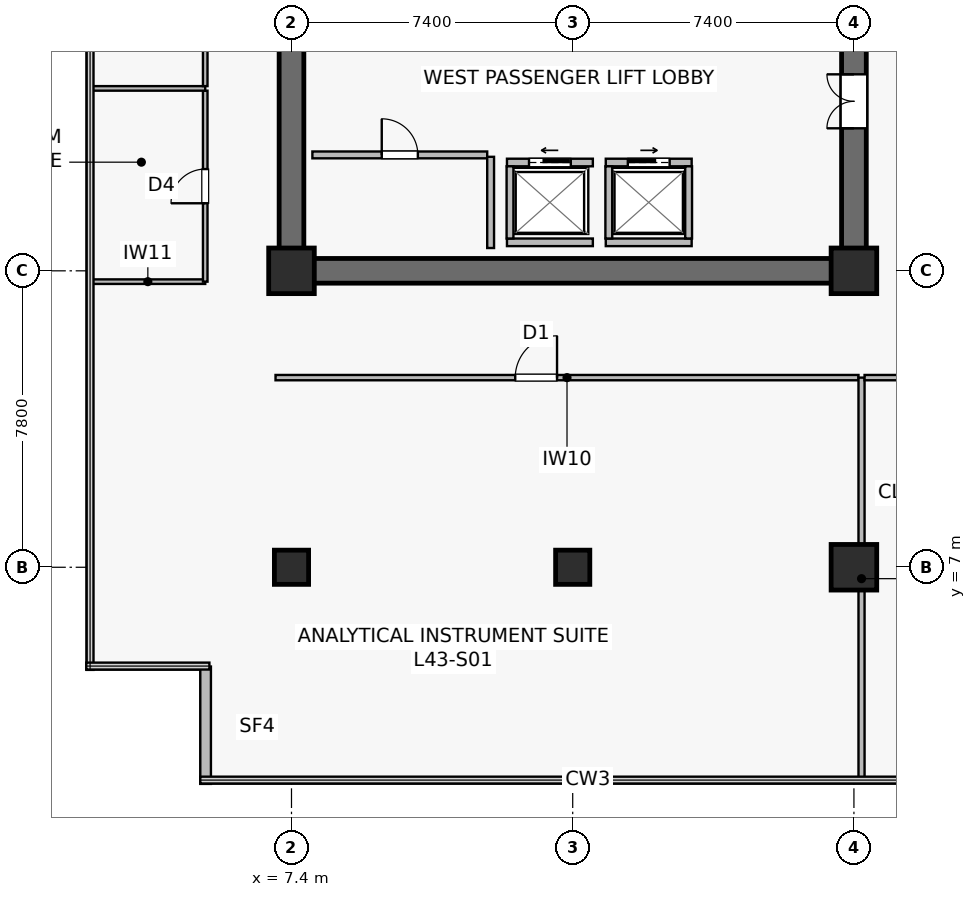
"""IFC4 building model, lengths in metres.
Left out: names, types, materials, properties, quantities, classifications, styles, units other than length and angle.
Written with IfcOpenShell. Run it as: python <this file> out.ifc"""

import sys

from ifc_helpers import new_model, si_unit, direction, frame, frame_2d, origin, origin_2d, place, context, subcontext, project, spatial, rectangle, extrude, source, transform, mapped, element, fill, save


model = new_model("IFC4")
c1 = context("Model", 3, precision=1e-05, world=origin(), true_north=direction((0.0, 1.0)))
c2 = subcontext(c1, "Body", "Model", "MODEL_VIEW")
j1 = project(units=[si_unit("LENGTHUNIT", "METRE"), si_unit("PLANEANGLEUNIT", "RADIAN")], contexts=[c1])
p1 = place(None, origin())
s1 = spatial("IfcSite", under=j1, at=p1, CompositionType="ELEMENT")
p2 = place(p1, origin())
s2 = spatial("IfcBuilding", under=s1, at=p2, CompositionType="ELEMENT")
p3 = place(p2, frame((0.0, 0.0, 178.9)))
s3 = spatial("IfcBuildingStorey", under=s2, at=p3, CompositionType="ELEMENT", Elevation=178.9)
p4 = place(p3, frame((7.075, 14.8, 0.0), z_axis=(0.0, 0.0, 1.0), x_axis=(1.0, 0.0, 0.0)))
e1 = element("IfcWall", 1, at=p4, inside=s3, PredefinedType="SHEAR", context=c2, shape_type="SweptSolid", body=[
    extrude(rectangle(XDim=15.45, YDim=0.65, at=frame_2d((7.725, 0.0))), origin(), (0.0, 0.0, 1.0), 3.79),
])
p5 = place(p3, frame((7.4, 15.125, 0.0), z_axis=(0.0, 0.0, 1.0), x_axis=(0.0, 1.0, 0.0)))
e2 = element("IfcWall", 2, at=p5, inside=s3, PredefinedType="SHEAR", context=c2, shape_type="SweptSolid", body=[
    extrude(rectangle(XDim=18.35, YDim=0.65, at=frame_2d((9.175, 0.0))), origin(), (0.0, 0.0, 1.0), 3.79),
])
p6 = place(p3, frame((22.2, 15.125, 0.0), z_axis=(0.0, 0.0, 1.0), x_axis=(0.0, 1.0, 0.0)))
e3 = element("IfcWall", 3, at=p6, inside=s3, PredefinedType="SHEAR", context=c2, shape_type="SweptSolid", body=[
    extrude(rectangle(XDim=18.35, YDim=0.65, at=frame_2d((9.175, 0.0))), origin(), (0.0, 0.0, 1.0), 3.79),
])
p7 = place(p6, frame((3.425, 0.0, 0.0)))
e4 = element("IfcOpeningElement", 4, at=p7, cuts=e3, PredefinedType="OPENING", context=c2, shape_type="SweptSolid", body=[
    extrude(rectangle(XDim=1.42, YDim=2.2, at=frame_2d((0.71, 1.1))), frame((0.0, 0.335, 0.0), z_axis=(0.0, -1.0, 0.0), x_axis=(1.0, 0.0, 0.0)), (0.0, 0.0, 1.0), 0.67),
])
m1 = source(origin(), c2, "Body", "SweptSolid", [
    extrude(rectangle(XDim=0.9, YDim=0.9, at=origin_2d()), origin(), (0.0, 0.0, 1.0), 4.1),
])
p8 = place(p3, frame((14.8, 7.0, 0.0), z_axis=(0.0, 0.0, 1.0), x_axis=(1.0, 0.0, 0.0)))
e5 = element("IfcColumn", 5, at=p8, inside=s3, PredefinedType="COLUMN", context=c2, shape_type="MappedRepresentation", body=[
    mapped(m1, transform((0.0, 0.0, 0.0), scale=1.0)),
])
m2 = source(origin(), c2, "Body", "SweptSolid", [
    extrude(rectangle(XDim=1.2, YDim=1.2, at=origin_2d()), origin(), (0.0, 0.0, 1.0), 4.1),
])
for number, where, z_axis, x_axis in (
    (6, (22.2, 7.0, 0.0), (0.0, 0.0, 1.0), (1.0, 0.0, 0.0)),
    (7, (7.4, 14.8, 0.0), (0.0, 0.0, 1.0), (1.0, 0.0, 0.0)),
    (8, (22.2, 14.8, 0.0), (0.0, 0.0, 1.0), (1.0, 0.0, 0.0)),
):
    element("IfcColumn", number, at=place(p3, frame(where, z_axis=z_axis, x_axis=x_axis)), inside=s3, PredefinedType="COLUMN", context=c2, shape_type="MappedRepresentation", body=[
        mapped(m2, transform((0.0, 0.0, 0.0), scale=1.0)),
    ])
p9 = place(p3, frame((7.4, 7.0, 0.0), z_axis=(0.0, 0.0, 1.0), x_axis=(1.0, 0.0, 0.0)))
e9 = element("IfcColumn", 9, at=p9, inside=s3, PredefinedType="COLUMN", context=c2, shape_type="MappedRepresentation", body=[
    mapped(m1, transform((0.0, 0.0, 0.0), scale=1.0)),
])
p10 = place(p3, frame((5.14, 4.388, 0.0), z_axis=(0.0, 0.0, 1.0), x_axis=(0.0, -1.0, 0.0)))
e10 = element("IfcWall", 10, at=p10, inside=s3, PredefinedType="STANDARD", context=c2, shape_type="SweptSolid", body=[
    extrude(rectangle(XDim=3.088, YDim=0.28, at=frame_2d((1.544, 0.0))), origin(), (0.0, 0.0, 1.0), 3.79),
])
p11 = place(p3, frame((13.07, 17.65, 0.0), z_axis=(0.0, 0.0, 1.0), x_axis=(1.0, 0.0, 0.0)))
e11 = element("IfcWall", 11, at=p11, inside=s3, PredefinedType="SOLIDWALL", context=c2, shape_type="SweptSolid", body=[
    extrude(rectangle(XDim=2.26, YDim=0.2, at=frame_2d((1.13, 0.0))), origin(), (0.0, 0.0, 1.0), 3.187),
])
p12 = place(p11, frame((0.58, 0.0, 0.0)))
e12 = element("IfcOpeningElement", 12, at=p12, cuts=e11, PredefinedType="OPENING", context=c2, shape_type="SweptSolid", body=[
    extrude(rectangle(XDim=1.1, YDim=2.22, at=frame_2d((0.55, 1.11))), frame((0.0, 0.11, 0.0), z_axis=(0.0, -1.0, 0.0), x_axis=(1.0, 0.0, 0.0)), (0.0, 0.0, 1.0), 0.22),
])
p13 = place(p3, frame((13.07, 15.55, 0.0), z_axis=(0.0, 0.0, 1.0), x_axis=(1.0, 0.0, 0.0)))
e13 = element("IfcWall", 13, at=p13, inside=s3, PredefinedType="SOLIDWALL", context=c2, shape_type="SweptSolid", body=[
    extrude(rectangle(XDim=2.26, YDim=0.2, at=frame_2d((1.13, 0.0))), origin(), (0.0, 0.0, 1.0), 3.187),
])
p14 = place(p3, frame((13.15, 15.65, 0.0), z_axis=(0.0, 0.0, 1.0), x_axis=(0.0, 1.0, 0.0)))
e14 = element("IfcWall", 14, at=p14, inside=s3, PredefinedType="SOLIDWALL", context=c2, shape_type="SweptSolid", body=[
    extrude(rectangle(XDim=1.9, YDim=0.18, at=frame_2d((0.95, 0.0))), origin(), (0.0, 0.0, 1.0), 3.79),
])
p15 = place(p3, frame((15.67, 17.65, 0.0), z_axis=(0.0, 0.0, 1.0), x_axis=(1.0, 0.0, 0.0)))
e15 = element("IfcWall", 15, at=p15, inside=s3, PredefinedType="SOLIDWALL", context=c2, shape_type="SweptSolid", body=[
    extrude(rectangle(XDim=2.26, YDim=0.2, at=frame_2d((1.13, 0.0))), origin(), (0.0, 0.0, 1.0), 3.79),
])
p16 = place(p15, frame((0.58, 0.0, 0.0)))
e16 = element("IfcOpeningElement", 16, at=p16, cuts=e15, PredefinedType="OPENING", context=c2, shape_type="SweptSolid", body=[
    extrude(rectangle(XDim=1.1, YDim=2.22, at=frame_2d((0.55, 1.11))), frame((0.0, 0.11, 0.0), z_axis=(0.0, -1.0, 0.0), x_axis=(1.0, 0.0, 0.0)), (0.0, 0.0, 1.0), 0.22),
])
p17 = place(p3, frame((15.67, 15.55, 0.0), z_axis=(0.0, 0.0, 1.0), x_axis=(1.0, 0.0, 0.0)))
e17 = element("IfcWall", 17, at=p17, inside=s3, PredefinedType="SOLIDWALL", context=c2, shape_type="SweptSolid", body=[
    extrude(rectangle(XDim=2.26, YDim=0.2, at=frame_2d((1.13, 0.0))), origin(), (0.0, 0.0, 1.0), 3.79),
])
for number, where, z_axis, x_axis in (
    (18, (15.75, 15.65, 0.0), (0.0, 0.0, 1.0), (0.0, 1.0, 0.0)),
    (19, (17.85, 15.65, 0.0), (0.0, 0.0, 1.0), (0.0, 1.0, 0.0)),
):
    element("IfcWall", number, at=place(p3, frame(where, z_axis=z_axis, x_axis=x_axis)), inside=s3, PredefinedType="SOLIDWALL", context=c2, shape_type="SweptSolid", body=[
        extrude(rectangle(XDim=1.9, YDim=0.18, at=frame_2d((0.95, 0.0))), origin(), (0.0, 0.0, 1.0), 3.79),
    ])
p18 = place(p3, frame((7.95, 17.85, 0.0), z_axis=(0.0, 0.0, 1.0), x_axis=(1.0, 0.0, 0.0)))
e20 = element("IfcWall", 20, at=p18, inside=s3, PredefinedType="SOLIDWALL", context=c2, shape_type="SweptSolid", body=[
    extrude(rectangle(XDim=4.6, YDim=0.18, at=frame_2d((2.3, 0.0))), origin(), (0.0, 0.0, 1.0), 3.79),
])
p19 = place(p18, frame((1.825, 0.0, 0.0)))
e21 = element("IfcOpeningElement", 21, at=p19, cuts=e20, PredefinedType="OPENING", context=c2, shape_type="SweptSolid", body=[
    extrude(rectangle(XDim=0.95, YDim=2.15, at=frame_2d((0.475, 1.075))), frame((0.0, 0.1, 0.0), z_axis=(0.0, -1.0, 0.0), x_axis=(1.0, 0.0, 0.0)), (0.0, 0.0, 1.0), 0.2),
])
p20 = place(p3, frame((12.64, 15.4, 0.0), z_axis=(0.0, 0.0, 1.0), x_axis=(0.0, 1.0, 0.0)))
e22 = element("IfcWall", 22, at=p20, inside=s3, PredefinedType="SOLIDWALL", context=c2, shape_type="SweptSolid", body=[
    extrude(rectangle(XDim=2.4, YDim=0.18, at=frame_2d((1.2, 0.0))), origin(), (0.0, 0.0, 1.0), 3.79),
])
p21 = place(p3, frame((6.98, 11.99, 0.0), z_axis=(0.0, 0.0, 1.0), x_axis=(1.0, 0.0, 0.0)))
e23 = element("IfcWall", 23, at=p21, inside=s3, PredefinedType="PARTITIONING", context=c2, shape_type="SweptSolid", body=[
    extrude(rectangle(XDim=15.34, YDim=0.14, at=frame_2d((7.67, 0.0))), origin(), (0.0, 0.0, 1.0), 3.187),
])
p22 = place(p21, frame((6.308, 0.0, 0.0)))
e24 = element("IfcOpeningElement", 24, at=p22, cuts=e23, PredefinedType="OPENING", context=c2, shape_type="SweptSolid", body=[
    extrude(rectangle(XDim=1.1, YDim=2.18, at=frame_2d((0.55, 1.09))), frame((0.0, 0.08, 0.0), z_axis=(0.0, -1.0, 0.0), x_axis=(1.0, 0.0, 0.0)), (0.0, 0.0, 1.0), 0.16),
])
p23 = place(p3, frame((22.4, 1.41, 0.0), z_axis=(0.0, 0.0, 1.0), x_axis=(0.0, 1.0, 0.0)))
e25 = element("IfcWall", 25, at=p23, inside=s3, PredefinedType="PARTITIONING", context=c2, shape_type="SweptSolid", body=[
    extrude(rectangle(XDim=10.58, YDim=0.16, at=frame_2d((5.29, 0.0))), origin(), (0.0, 0.0, 1.0), 3.075),
])
p24 = place(p3, frame((22.48, 11.99, 0.0), z_axis=(0.0, 0.0, 1.0), x_axis=(1.0, 0.0, 0.0)))
e26 = element("IfcWall", 26, at=p24, inside=s3, PredefinedType="PARTITIONING", context=c2, shape_type="SweptSolid", body=[
    extrude(rectangle(XDim=13.44, YDim=0.14, at=frame_2d((6.72, 0.0))), origin(), (0.0, 0.0, 1.0), 3.187),
])
p25 = place(p24, frame((6.868, 0.0, 0.0)))
e27 = element("IfcOpeningElement", 27, at=p25, cuts=e26, PredefinedType="OPENING", context=c2, shape_type="SweptSolid", body=[
    extrude(rectangle(XDim=1.1, YDim=2.18, at=frame_2d((0.55, 1.09))), frame((0.0, 0.08, 0.0), z_axis=(0.0, -1.0, 0.0), x_axis=(1.0, 0.0, 0.0)), (0.0, 0.0, 1.0), 0.16),
])
p26 = place(p3, frame((2.11, 14.515, 0.0), z_axis=(0.0, 0.0, 1.0), x_axis=(1.0, 0.0, 0.0)))
e28 = element("IfcWall", 28, at=p26, inside=s3, PredefinedType="PARTITIONING", context=c2, shape_type="SweptSolid", body=[
    extrude(rectangle(XDim=3.02, YDim=0.12, at=frame_2d((1.51, 0.0))), origin(), (0.0, 0.0, 1.0), 3.79),
])
p27 = place(p3, frame((5.13, 14.515, 0.0), z_axis=(0.0, 0.0, 1.0), x_axis=(0.0, 1.0, 0.0)))
e29 = element("IfcWall", 29, at=p27, inside=s3, PredefinedType="PARTITIONING", context=c2, shape_type="SweptSolid", body=[
    extrude(rectangle(XDim=5.025, YDim=0.12, at=frame_2d((2.513, 0.0))), origin(), (0.0, 0.0, 1.0), 3.79),
])
p28 = place(p27, frame((2.062, 0.0, 0.0)))
e30 = element("IfcOpeningElement", 30, at=p28, cuts=e29, PredefinedType="OPENING", context=c2, shape_type="SweptSolid", body=[
    extrude(rectangle(XDim=0.9, YDim=2.1, at=frame_2d((0.45, 1.05))), frame((0.0, 0.07, 0.0), z_axis=(0.0, -1.0, 0.0), x_axis=(1.0, 0.0, 0.0)), (0.0, 0.0, 1.0), 0.14),
])
p29 = place(p3, frame((2.11, 19.6, 0.0), z_axis=(0.0, 0.0, 1.0), x_axis=(1.0, 0.0, 0.0)))
e31 = element("IfcWall", 31, at=p29, inside=s3, PredefinedType="PARTITIONING", context=c2, shape_type="SweptSolid", body=[
    extrude(rectangle(XDim=3.02, YDim=0.12, at=frame_2d((1.51, 0.0))), origin(), (0.0, 0.0, 1.0), 3.79),
])
p30 = place(p3, frame((5.13, 19.66, 0.0), z_axis=(0.0, 0.0, 1.0), x_axis=(0.0, 1.0, 0.0)))
e32 = element("IfcWall", 32, at=p30, inside=s3, PredefinedType="PARTITIONING", context=c2, shape_type="SweptSolid", body=[
    extrude(rectangle(XDim=6.28, YDim=0.12, at=frame_2d((3.14, 0.0))), origin(), (0.0, 0.0, 1.0), 3.79),
])
p31 = place(p30, frame((2.69, 0.0, 0.0)))
e33 = element("IfcOpeningElement", 33, at=p31, cuts=e32, PredefinedType="OPENING", context=c2, shape_type="SweptSolid", body=[
    extrude(rectangle(XDim=0.9, YDim=2.1, at=frame_2d((0.45, 1.05))), frame((0.0, 0.07, 0.0), z_axis=(0.0, -1.0, 0.0), x_axis=(1.0, 0.0, 0.0)), (0.0, 0.0, 1.0), 0.14),
])
m3 = source(origin(), c2, "Body", "SweptSolid", [
    extrude(rectangle(XDim=1.1, YDim=2.22, at=frame_2d((0.55, 1.11))), frame((0.0, 0.025, 0.0), z_axis=(0.0, -1.0, 0.0), x_axis=(1.0, 0.0, 0.0)), (0.0, 0.0, 1.0), 0.05),
])
p32 = place(p12, origin())
e34 = element("IfcDoor", 34, at=p32, inside=s3, OperationType="SLIDING_TO_LEFT", PredefinedType="USERDEFINED", context=c2, shape_type="MappedRepresentation", body=[
    mapped(m3, transform((0.0, 0.0, 0.0), scale=1.0)),
])
fill(e12, e34)
p33 = place(p16, origin())
e35 = element("IfcDoor", 35, at=p33, inside=s3, OperationType="SLIDING_TO_RIGHT", PredefinedType="USERDEFINED", context=c2, shape_type="MappedRepresentation", body=[
    mapped(m3, transform((0.0, 0.0, 0.0), scale=1.0)),
])
fill(e16, e35)
m4 = source(origin(), c2, "Body", "SweptSolid", [
    extrude(rectangle(XDim=0.95, YDim=2.15, at=frame_2d((0.475, 1.075))), frame((0.0, 0.025, 0.0), z_axis=(0.0, -1.0, 0.0), x_axis=(1.0, 0.0, 0.0)), (0.0, 0.0, 1.0), 0.05),
])
p34 = place(p19, origin())
e36 = element("IfcDoor", 36, at=p34, inside=s3, OperationType="SINGLE_SWING_LEFT", PredefinedType="DOOR", context=c2, shape_type="MappedRepresentation", body=[
    mapped(m4, transform((0.0, 0.0, 0.0), scale=1.0)),
])
fill(e21, e36)
m5 = source(origin(), c2, "Body", "SweptSolid", [
    extrude(rectangle(XDim=1.42, YDim=2.2, at=frame_2d((0.71, 1.1))), frame((0.0, 0.025, 0.0), z_axis=(0.0, -1.0, 0.0), x_axis=(1.0, 0.0, 0.0)), (0.0, 0.0, 1.0), 0.05),
])
p35 = place(p7, origin())
e37 = element("IfcDoor", 37, at=p35, inside=s3, OperationType="DOUBLE_DOOR_SINGLE_SWING", PredefinedType="DOOR", context=c2, shape_type="MappedRepresentation", body=[
    mapped(m5, transform((0.0, 0.0, 0.0), scale=1.0)),
])
fill(e4, e37)
m6 = source(origin(), c2, "Body", "SweptSolid", [
    extrude(rectangle(XDim=1.1, YDim=2.18, at=frame_2d((0.55, 1.09))), frame((0.0, 0.025, 0.0), z_axis=(0.0, -1.0, 0.0), x_axis=(1.0, 0.0, 0.0)), (0.0, 0.0, 1.0), 0.05),
])
p36 = place(p22, origin())
e38 = element("IfcDoor", 38, at=p36, inside=s3, OperationType="SINGLE_SWING_RIGHT", PredefinedType="DOOR", context=c2, shape_type="MappedRepresentation", body=[
    mapped(m6, transform((0.0, 0.0, 0.0), scale=1.0)),
])
fill(e24, e38)
m7 = source(origin(), c2, "Body", "SweptSolid", [
    extrude(rectangle(XDim=0.9, YDim=2.1, at=frame_2d((0.45, 1.05))), frame((0.0, 0.025, 0.0), z_axis=(0.0, -1.0, 0.0), x_axis=(1.0, 0.0, 0.0)), (0.0, 0.0, 1.0), 0.05),
])
p37 = place(p28, origin())
e39 = element("IfcDoor", 39, at=p37, inside=s3, OperationType="SINGLE_SWING_LEFT", PredefinedType="DOOR", context=c2, shape_type="MappedRepresentation", body=[
    mapped(m7, transform((0.0, 0.0, 0.0), scale=1.0)),
])
fill(e30, e39)
save(model, sys.argv[1])
